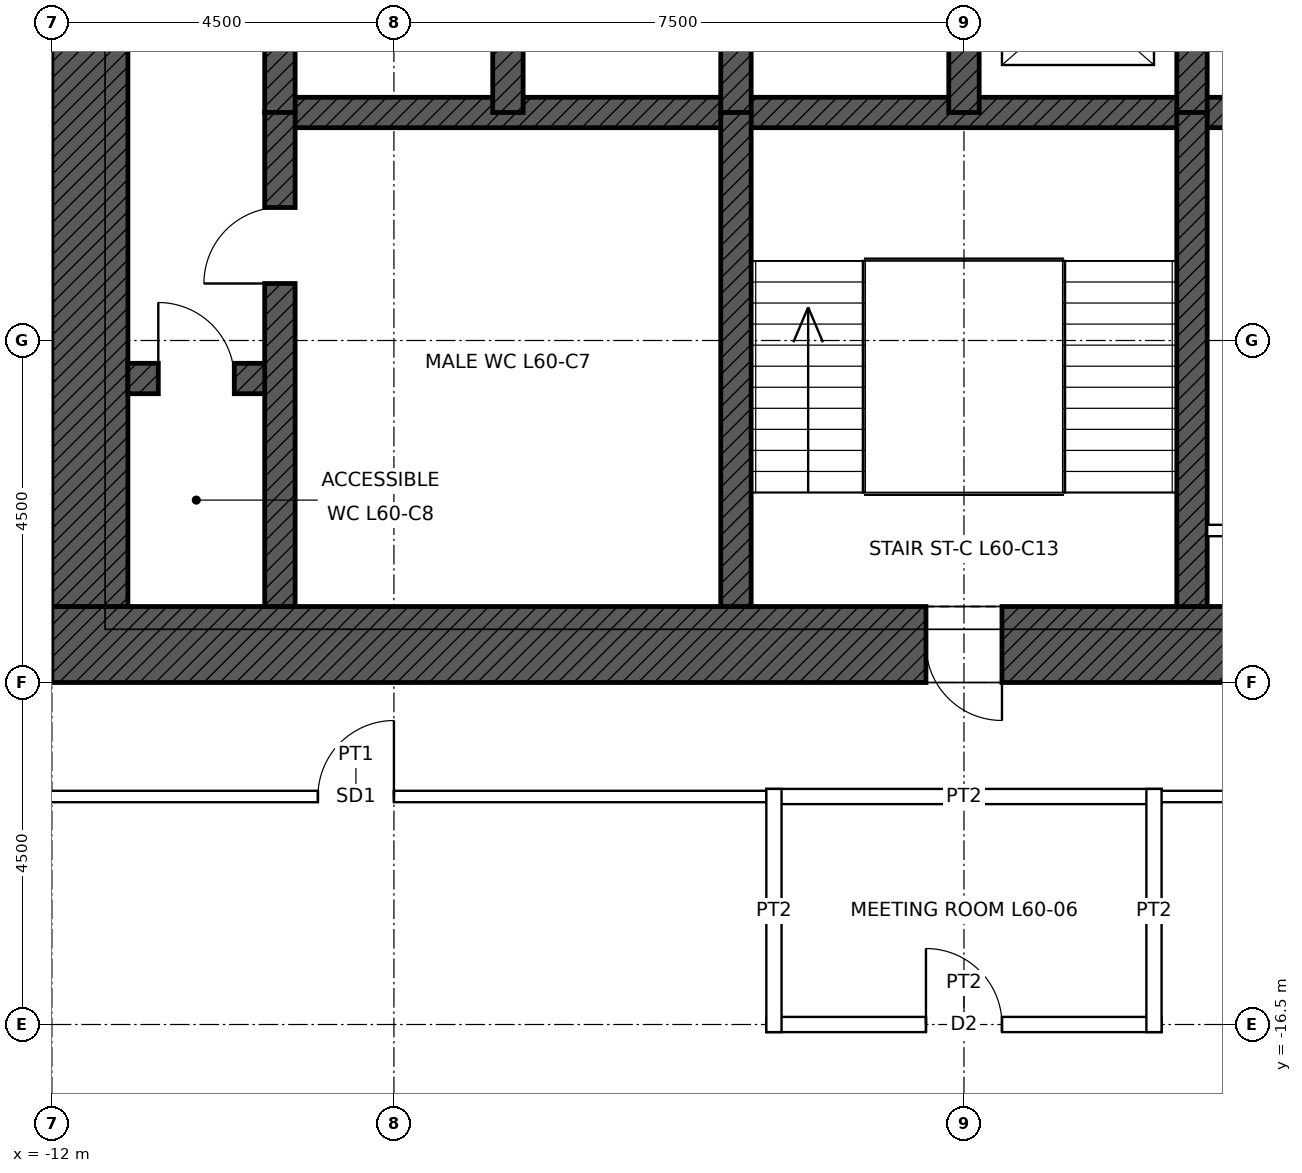
"""IFC4 building model, lengths in metres.
Left out: names, types, materials, properties, quantities, classifications, styles, units other than length and angle.
Written with IfcOpenShell. Run it as: python <this file> out.ifc"""

import sys

from ifc_helpers import new_model, si_unit, direction, frame, frame_2d, origin, place, context, subcontext, project, spatial, rectangle, extrude, element, fill, save


model = new_model("IFC4")
c1 = context("Model", 3, precision=1e-05, world=origin(), true_north=direction((0.0, 1.0)))
c2 = subcontext(c1, "Body", "Model", "MODEL_VIEW")
j1 = project(units=[si_unit("LENGTHUNIT", "METRE"), si_unit("PLANEANGLEUNIT", "RADIAN")], contexts=[c1])
p1 = place(None, origin())
s1 = spatial("IfcSite", under=j1, at=p1, CompositionType="ELEMENT")
p2 = place(p1, origin())
s2 = spatial("IfcBuilding", under=s1, at=p2, CompositionType="ELEMENT")
p3 = place(p2, frame((0.0, 0.0, 275.9)))
s3 = spatial("IfcBuildingStorey", under=s2, at=p3, CompositionType="ELEMENT", Elevation=275.9)
p4 = place(p3, frame((12.0, -11.5, 0.0), z_axis=(0.0, 0.0, 1.0), x_axis=(-1.0, 0.0, 0.0)))
e1 = element("IfcWall", 1, at=p4, inside=s3, PredefinedType="SHEAR", context=c2, shape_type="SweptSolid", body=[
    extrude(rectangle(XDim=24.0, YDim=1.0, at=frame_2d((12.0, 0.0))), origin(), (0.0, 0.0, 1.0), 4.0),
])
p5 = place(p4, frame((11.5, 0.0, 0.0)))
e2 = element("IfcOpeningElement", 2, at=p5, cuts=e1, PredefinedType="OPENING", context=c2, shape_type="SweptSolid", body=[
    extrude(rectangle(XDim=1.0, YDim=2.1, at=frame_2d((0.5, 1.05))), frame((0.0, 0.51, 0.0), z_axis=(0.0, -1.0, 0.0), x_axis=(1.0, 0.0, 0.0)), (0.0, 0.0, 1.0), 1.02),
])
p6 = place(p4, frame((1.0, 0.0, 0.0)))
e3 = element("IfcOpeningElement", 3, at=p6, cuts=e1, PredefinedType="OPENING", context=c2, shape_type="SweptSolid", body=[
    extrude(rectangle(XDim=1.0, YDim=2.4, at=frame_2d((0.5, 1.2))), frame((0.0, 0.51, 0.0), z_axis=(0.0, -1.0, 0.0), x_axis=(1.0, 0.0, 0.0)), (0.0, 0.0, 1.0), 1.02),
])
p7 = place(p3, frame((-11.5, -11.0, 0.0), z_axis=(0.0, 0.0, 1.0), x_axis=(0.0, 1.0, 0.0)))
e4 = element("IfcWall", 4, at=p7, inside=s3, PredefinedType="SHEAR", context=c2, shape_type="SweptSolid", body=[
    extrude(rectangle(XDim=22.0, YDim=1.0, at=frame_2d((11.0, 0.0))), origin(), (0.0, 0.0, 1.0), 4.0),
])
p8 = place(p7, frame((10.5, 0.0, 0.0)))
e5 = element("IfcOpeningElement", 5, at=p8, cuts=e4, PredefinedType="OPENING", context=c2, shape_type="SweptSolid", body=[
    extrude(rectangle(XDim=1.0, YDim=2.4, at=frame_2d((0.5, 1.2))), frame((0.0, 0.51, 0.0), z_axis=(0.0, -1.0, 0.0), x_axis=(1.0, 0.0, 0.0)), (0.0, 0.0, 1.0), 1.02),
])
p9 = place(p3, frame((-9.0, -4.5, 0.0), z_axis=(0.0, 0.0, 1.0), x_axis=(1.0, 0.0, 0.0)))
e6 = element("IfcWall", 6, at=p9, inside=s3, PredefinedType="SHEAR", context=c2, shape_type="SweptSolid", body=[
    extrude(rectangle(XDim=18.0, YDim=0.4, at=frame_2d((9.0, 0.0))), origin(), (0.0, 0.0, 1.0), 4.0),
])
p10 = place(p3, frame((-11.0, -8.0, 0.0), z_axis=(0.0, 0.0, 1.0), x_axis=(1.0, 0.0, 0.0)))
e7 = element("IfcWall", 7, at=p10, inside=s3, PredefinedType="SHEAR", context=c2, shape_type="SweptSolid", body=[
    extrude(rectangle(XDim=2.0, YDim=0.4, at=frame_2d((1.0, 0.0))), origin(), (0.0, 0.0, 1.0), 4.0),
])
p11 = place(p10, frame((0.4, 0.0, 0.0)))
e8 = element("IfcOpeningElement", 8, at=p11, cuts=e7, PredefinedType="OPENING", context=c2, shape_type="SweptSolid", body=[
    extrude(rectangle(XDim=1.0, YDim=2.1, at=frame_2d((0.5, 1.05))), frame((0.0, 0.21, 0.0), z_axis=(0.0, -1.0, 0.0), x_axis=(1.0, 0.0, 0.0)), (0.0, 0.0, 1.0), 0.42),
])
for number, where, z_axis, x_axis in (
    (9, (-9.0, -4.5, 0.0), (0.0, 0.0, 1.0), (0.0, 1.0, 0.0)),
    (10, (-6.0, -4.5, 0.0), (0.0, 0.0, 1.0), (0.0, 1.0, 0.0)),
    (11, (-3.0, -4.5, 0.0), (0.0, 0.0, 1.0), (0.0, 1.0, 0.0)),
    (12, (0.0, -4.5, 0.0), (0.0, 0.0, 1.0), (0.0, 1.0, 0.0)),
    (13, (3.0, -4.5, 0.0), (0.0, 0.0, 1.0), (0.0, 1.0, 0.0)),
):
    element("IfcWall", number, at=place(p3, frame(where, z_axis=z_axis, x_axis=x_axis)), inside=s3, PredefinedType="SHEAR", context=c2, shape_type="SweptSolid", body=[
        extrude(rectangle(XDim=3.0, YDim=0.4, at=frame_2d((1.5, 0.0))), origin(), (0.0, 0.0, 1.0), 4.0),
    ])
p12 = place(p3, frame((-9.0, -11.0, 0.0), z_axis=(0.0, 0.0, 1.0), x_axis=(0.0, 1.0, 0.0)))
e14 = element("IfcWall", 14, at=p12, inside=s3, PredefinedType="SHEAR", context=c2, shape_type="SweptSolid", body=[
    extrude(rectangle(XDim=6.5, YDim=0.4, at=frame_2d((3.25, 0.0))), origin(), (0.0, 0.0, 1.0), 4.0),
])
p13 = place(p12, frame((4.25, 0.0, 0.0)))
e15 = element("IfcOpeningElement", 15, at=p13, cuts=e14, PredefinedType="OPENING", context=c2, shape_type="SweptSolid", body=[
    extrude(rectangle(XDim=1.0, YDim=2.1, at=frame_2d((0.5, 1.05))), frame((0.0, 0.21, 0.0), z_axis=(0.0, -1.0, 0.0), x_axis=(1.0, 0.0, 0.0)), (0.0, 0.0, 1.0), 0.42),
])
for number, where, z_axis, x_axis in (
    (16, (-3.0, -11.0, 0.0), (0.0, 0.0, 1.0), (0.0, 1.0, 0.0)),
    (17, (3.0, -11.0, 0.0), (0.0, 0.0, 1.0), (0.0, 1.0, 0.0)),
):
    element("IfcWall", number, at=place(p3, frame(where, z_axis=z_axis, x_axis=x_axis)), inside=s3, PredefinedType="SHEAR", context=c2, shape_type="SweptSolid", body=[
        extrude(rectangle(XDim=6.5, YDim=0.4, at=frame_2d((3.25, 0.0))), origin(), (0.0, 0.0, 1.0), 4.0),
    ])
p14 = place(p3, frame((-2.6, -16.5, 0.0), z_axis=(0.0, 0.0, 1.0), x_axis=(1.0, 0.0, 0.0)))
e18 = element("IfcWall", 18, at=p14, inside=s3, PredefinedType="PARTITIONING", context=c2, shape_type="SweptSolid", body=[
    extrude(rectangle(XDim=5.2, YDim=0.2, at=frame_2d((2.6, 0.0))), origin(), (0.0, 0.0, 1.0), 3.85),
])
p15 = place(p14, frame((2.1, 0.0, 0.0)))
e19 = element("IfcOpeningElement", 19, at=p15, cuts=e18, PredefinedType="OPENING", context=c2, shape_type="SweptSolid", body=[
    extrude(rectangle(XDim=1.0, YDim=2.1, at=frame_2d((0.5, 1.05))), frame((0.0, 0.11, 0.0), z_axis=(0.0, -1.0, 0.0), x_axis=(1.0, 0.0, 0.0)), (0.0, 0.0, 1.0), 0.22),
])
p16 = place(p3, frame((-13.575, -13.5, 0.0), z_axis=(0.0, 0.0, 1.0), x_axis=(1.0, 0.0, 0.0)))
e20 = element("IfcWall", 20, at=p16, inside=s3, PredefinedType="PARTITIONING", context=c2, shape_type="SweptSolid", body=[
    extrude(rectangle(XDim=11.15, YDim=0.15, at=frame_2d((5.575, 0.0))), origin(), (0.0, 0.0, 1.0), 3.85),
])
p17 = place(p16, frame((5.075, 0.0, 0.0)))
e21 = element("IfcOpeningElement", 21, at=p17, cuts=e20, PredefinedType="OPENING", context=c2, shape_type="SweptSolid", body=[
    extrude(rectangle(XDim=1.0, YDim=2.4, at=frame_2d((0.5, 1.2))), frame((0.0, 0.085, 0.0), z_axis=(0.0, -1.0, 0.0), x_axis=(1.0, 0.0, 0.0)), (0.0, 0.0, 1.0), 0.17),
])
p18 = place(p3, frame((-2.6, -13.5, 0.0), z_axis=(0.0, 0.0, 1.0), x_axis=(1.0, 0.0, 0.0)))
e22 = element("IfcWall", 22, at=p18, inside=s3, PredefinedType="PARTITIONING", context=c2, shape_type="SweptSolid", body=[
    extrude(rectangle(XDim=5.2, YDim=0.2, at=frame_2d((2.6, 0.0))), origin(), (0.0, 0.0, 1.0), 3.85),
])
p19 = place(p3, frame((2.425, -13.5, 0.0), z_axis=(0.0, 0.0, 1.0), x_axis=(1.0, 0.0, 0.0)))
e23 = element("IfcWall", 23, at=p19, inside=s3, PredefinedType="PARTITIONING", context=c2, shape_type="SweptSolid", body=[
    extrude(rectangle(XDim=11.15, YDim=0.15, at=frame_2d((5.575, 0.0))), origin(), (0.0, 0.0, 1.0), 3.85),
])
for number, where, z_axis, x_axis in (
    (24, (-2.5, -16.6, 0.0), (0.0, 0.0, 1.0), (0.0, 1.0, 0.0)),
    (25, (2.5, -16.6, 0.0), (0.0, 0.0, 1.0), (0.0, 1.0, 0.0)),
):
    element("IfcWall", number, at=place(p3, frame(where, z_axis=z_axis, x_axis=x_axis)), inside=s3, PredefinedType="PARTITIONING", context=c2, shape_type="SweptSolid", body=[
        extrude(rectangle(XDim=3.2, YDim=0.2, at=frame_2d((1.6, 0.0))), origin(), (0.0, 0.0, 1.0), 3.85),
    ])
p20 = place(p3, frame((3.2, -10.0, 0.0), z_axis=(0.0, 0.0, 1.0), x_axis=(1.0, 0.0, 0.0)))
e26 = element("IfcWall", 26, at=p20, inside=s3, PredefinedType="PARTITIONING", context=c2, shape_type="SweptSolid", body=[
    extrude(rectangle(XDim=5.6, YDim=0.15, at=frame_2d((2.8, 0.0))), origin(), (0.0, 0.0, 1.0), 3.75),
])
p21 = place(p20, frame((2.3, 0.0, 0.0)))
e27 = element("IfcOpeningElement", 27, at=p21, cuts=e26, PredefinedType="OPENING", context=c2, shape_type="SweptSolid", body=[
    extrude(rectangle(XDim=1.0, YDim=2.1, at=frame_2d((0.5, 1.05))), frame((0.0, 0.085, 0.0), z_axis=(0.0, -1.0, 0.0), x_axis=(1.0, 0.0, 0.0)), (0.0, 0.0, 1.0), 0.17),
])
p22 = place(p5, origin())
e28 = element("IfcDoor", 28, at=p22, inside=s3, OperationType="SINGLE_SWING_LEFT", PredefinedType="DOOR", context=c2, shape_type="SweptSolid", body=[
    extrude(rectangle(XDim=1.0, YDim=2.1, at=frame_2d((0.5, 1.05))), frame((0.0, 0.485, 0.0), z_axis=(0.0, -1.0, 0.0), x_axis=(1.0, 0.0, 0.0)), (0.0, 0.0, 1.0), 0.05),
])
fill(e2, e28)
p23 = place(p13, origin())
e29 = element("IfcDoor", 29, at=p23, inside=s3, OperationType="SINGLE_SWING_LEFT", PredefinedType="DOOR", context=c2, shape_type="SweptSolid", body=[
    extrude(rectangle(XDim=1.0, YDim=2.1, at=frame_2d((0.5, 1.05))), frame((0.0, 0.025, 0.0), z_axis=(0.0, -1.0, 0.0), x_axis=(1.0, 0.0, 0.0)), (0.0, 0.0, 1.0), 0.05),
])
fill(e15, e29)
p24 = place(p11, origin())
e30 = element("IfcDoor", 30, at=p24, inside=s3, OperationType="SINGLE_SWING_LEFT", PredefinedType="DOOR", context=c2, shape_type="SweptSolid", body=[
    extrude(rectangle(XDim=1.0, YDim=2.1, at=frame_2d((0.5, 1.05))), frame((0.0, 0.025, 0.0), z_axis=(0.0, -1.0, 0.0), x_axis=(1.0, 0.0, 0.0)), (0.0, 0.0, 1.0), 0.05),
])
fill(e8, e30)
p25 = place(p15, origin())
e31 = element("IfcDoor", 31, at=p25, inside=s3, OperationType="SINGLE_SWING_LEFT", PredefinedType="DOOR", context=c2, shape_type="SweptSolid", body=[
    extrude(rectangle(XDim=1.0, YDim=2.1, at=frame_2d((0.5, 1.05))), frame((0.0, 0.025, 0.0), z_axis=(0.0, -1.0, 0.0), x_axis=(1.0, 0.0, 0.0)), (0.0, 0.0, 1.0), 0.05),
])
fill(e19, e31)
p26 = place(p17, origin())
e32 = element("IfcDoor", 32, at=p26, inside=s3, OperationType="SINGLE_SWING_RIGHT", PredefinedType="DOOR", context=c2, shape_type="SweptSolid", body=[
    extrude(rectangle(XDim=1.0, YDim=2.4, at=frame_2d((0.5, 1.2))), frame((0.0, 0.025, 0.0), z_axis=(0.0, -1.0, 0.0), x_axis=(1.0, 0.0, 0.0)), (0.0, 0.0, 1.0), 0.05),
])
fill(e21, e32)
save(model, sys.argv[1])
